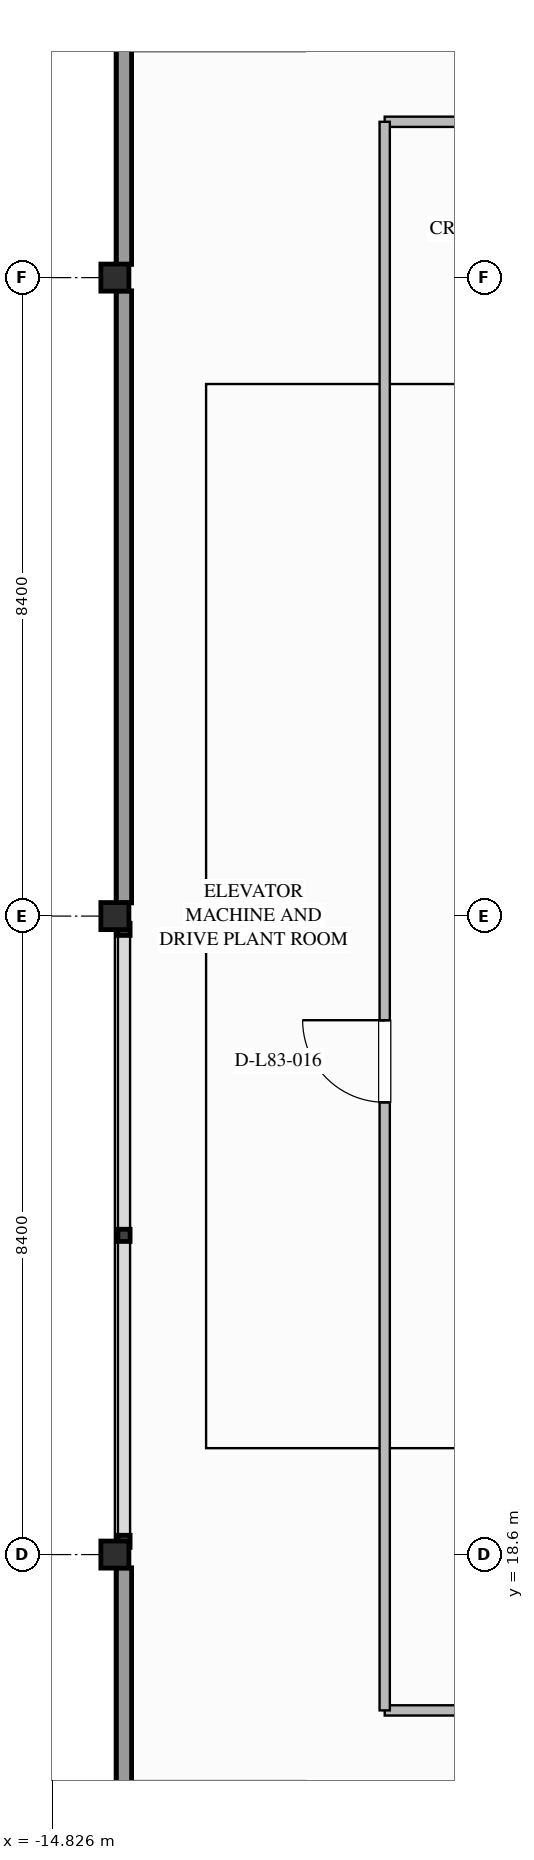
"""IFC4 building model, lengths in metres.
Left out: names, types, materials, properties, quantities, classifications, styles, units other than length and angle.
Written with IfcOpenShell. Run it as: python <this file> out.ifc"""

import sys

from ifc_helpers import new_model, si_unit, direction, frame, frame_2d, origin, origin_2d, place, context, subcontext, project, spatial, rectangle, i_section, extrude, element, fill, save


model = new_model("IFC4")
c1 = context("Model", 3, precision=1e-05, world=origin(), true_north=direction((0.0, 1.0)))
c2 = subcontext(c1, "Body", "Model", "MODEL_VIEW")
j1 = project(units=[si_unit("LENGTHUNIT", "METRE"), si_unit("PLANEANGLEUNIT", "RADIAN")], contexts=[c1])
p1 = place(None, origin())
s1 = spatial("IfcSite", under=j1, at=p1, CompositionType="ELEMENT")
p2 = place(p1, origin())
s2 = spatial("IfcBuilding", under=s1, at=p2, CompositionType="ELEMENT")
p3 = place(p2, frame((0.0, 0.0, 319.4)))
s3 = spatial("IfcBuildingStorey", under=s2, at=p3, CompositionType="ELEMENT", Elevation=319.4)
for number, where, z_axis, x_axis in (
    (1, (-14.0, 18.6, 0.0), (0.0, 0.0, 1.0), (1.0, 0.0, 0.0)),
    (2, (-14.0, 27.0, 0.0), (0.0, 0.0, 1.0), (1.0, 0.0, 0.0)),
    (3, (-14.0, 35.4, 0.0), (0.0, 0.0, 1.0), (1.0, 0.0, 0.0)),
):
    element("IfcColumn", number, at=place(p3, frame(where, z_axis=z_axis, x_axis=x_axis)), inside=s3, PredefinedType="COLUMN", context=c2, shape_type="SweptSolid", body=[
        extrude(i_section(OverallWidth=0.369, OverallDepth=0.356, WebThickness=0.011, FlangeThickness=0.018, FilletRadius=0.025, at=origin_2d()), origin(), (0.0, 0.0, 1.0), 3.797),
    ])
p4 = place(p3, frame((-10.45, 16.55, 0.0), z_axis=(0.0, 0.0, 1.0), x_axis=(1.0, 0.0, 0.0)))
e4 = element("IfcWall", 4, at=p4, inside=s3, PredefinedType="PARTITIONING", context=c2, shape_type="SweptSolid", body=[
    extrude(rectangle(XDim=20.9, YDim=0.135, at=frame_2d((10.45, 0.0))), origin(), (0.0, 0.0, 1.0), 3.48),
])
p5 = place(p4, frame((3.0, 0.0, 0.0)))
e5 = element("IfcOpeningElement", 5, at=p5, cuts=e4, PredefinedType="OPENING", context=c2, shape_type="SweptSolid", body=[
    extrude(rectangle(XDim=1.08, YDim=2.04, at=frame_2d((0.54, 1.02))), frame((0.0, 0.077, 0.0), z_axis=(0.0, -1.0, 0.0), x_axis=(1.0, 0.0, 0.0)), (0.0, 0.0, 1.0), 0.155),
])
p6 = place(p4, frame((15.0, 0.0, 0.0)))
e6 = element("IfcOpeningElement", 6, at=p6, cuts=e4, PredefinedType="OPENING", context=c2, shape_type="SweptSolid", body=[
    extrude(rectangle(XDim=1.08, YDim=2.04, at=frame_2d((0.54, 1.02))), frame((0.0, 0.077, 0.0), z_axis=(0.0, -1.0, 0.0), x_axis=(1.0, 0.0, 0.0)), (0.0, 0.0, 1.0), 0.155),
])
p7 = place(p3, frame((-10.45, 37.45, 0.0), z_axis=(0.0, 0.0, 1.0), x_axis=(1.0, 0.0, 0.0)))
e7 = element("IfcWall", 7, at=p7, inside=s3, PredefinedType="PARTITIONING", context=c2, shape_type="SweptSolid", body=[
    extrude(rectangle(XDim=20.9, YDim=0.135, at=frame_2d((10.45, 0.0))), origin(), (0.0, 0.0, 1.0), 3.48),
])
p8 = place(p7, frame((3.0, 0.0, 0.0)))
e8 = element("IfcOpeningElement", 8, at=p8, cuts=e7, PredefinedType="OPENING", context=c2, shape_type="SweptSolid", body=[
    extrude(rectangle(XDim=1.08, YDim=2.04, at=frame_2d((0.54, 1.02))), frame((0.0, 0.077, 0.0), z_axis=(0.0, -1.0, 0.0), x_axis=(1.0, 0.0, 0.0)), (0.0, 0.0, 1.0), 0.155),
])
p9 = place(p7, frame((15.0, 0.0, 0.0)))
e9 = element("IfcOpeningElement", 9, at=p9, cuts=e7, PredefinedType="OPENING", context=c2, shape_type="SweptSolid", body=[
    extrude(rectangle(XDim=1.08, YDim=2.04, at=frame_2d((0.54, 1.02))), frame((0.0, 0.077, 0.0), z_axis=(0.0, -1.0, 0.0), x_axis=(1.0, 0.0, 0.0)), (0.0, 0.0, 1.0), 0.155),
])
p10 = place(p3, frame((-10.45, 16.55, 0.0), z_axis=(0.0, 0.0, 1.0), x_axis=(0.0, 1.0, 0.0)))
e10 = element("IfcWall", 10, at=p10, inside=s3, PredefinedType="PARTITIONING", context=c2, shape_type="SweptSolid", body=[
    extrude(rectangle(XDim=20.9, YDim=0.135, at=frame_2d((10.45, 0.0))), origin(), (0.0, 0.0, 1.0), 3.48),
])
p11 = place(p10, frame((8.0, 0.0, 0.0)))
e11 = element("IfcOpeningElement", 11, at=p11, cuts=e10, PredefinedType="OPENING", context=c2, shape_type="SweptSolid", body=[
    extrude(rectangle(XDim=1.08, YDim=2.04, at=frame_2d((0.54, 1.02))), frame((0.0, 0.077, 0.0), z_axis=(0.0, -1.0, 0.0), x_axis=(1.0, 0.0, 0.0)), (0.0, 0.0, 1.0), 0.155),
])
p12 = place(p11, origin())
e12 = element("IfcDoor", 12, at=p12, inside=s3, OperationType="SINGLE_SWING_RIGHT", PredefinedType="DOOR", context=c2, shape_type="SweptSolid", body=[
    extrude(rectangle(XDim=1.08, YDim=2.04, at=frame_2d((0.54, 1.02))), frame((0.0, 0.025, 0.0), z_axis=(0.0, -1.0, 0.0), x_axis=(1.0, 0.0, 0.0)), (0.0, 0.0, 1.0), 0.05),
])
fill(e11, e12)
save(model, sys.argv[1])
